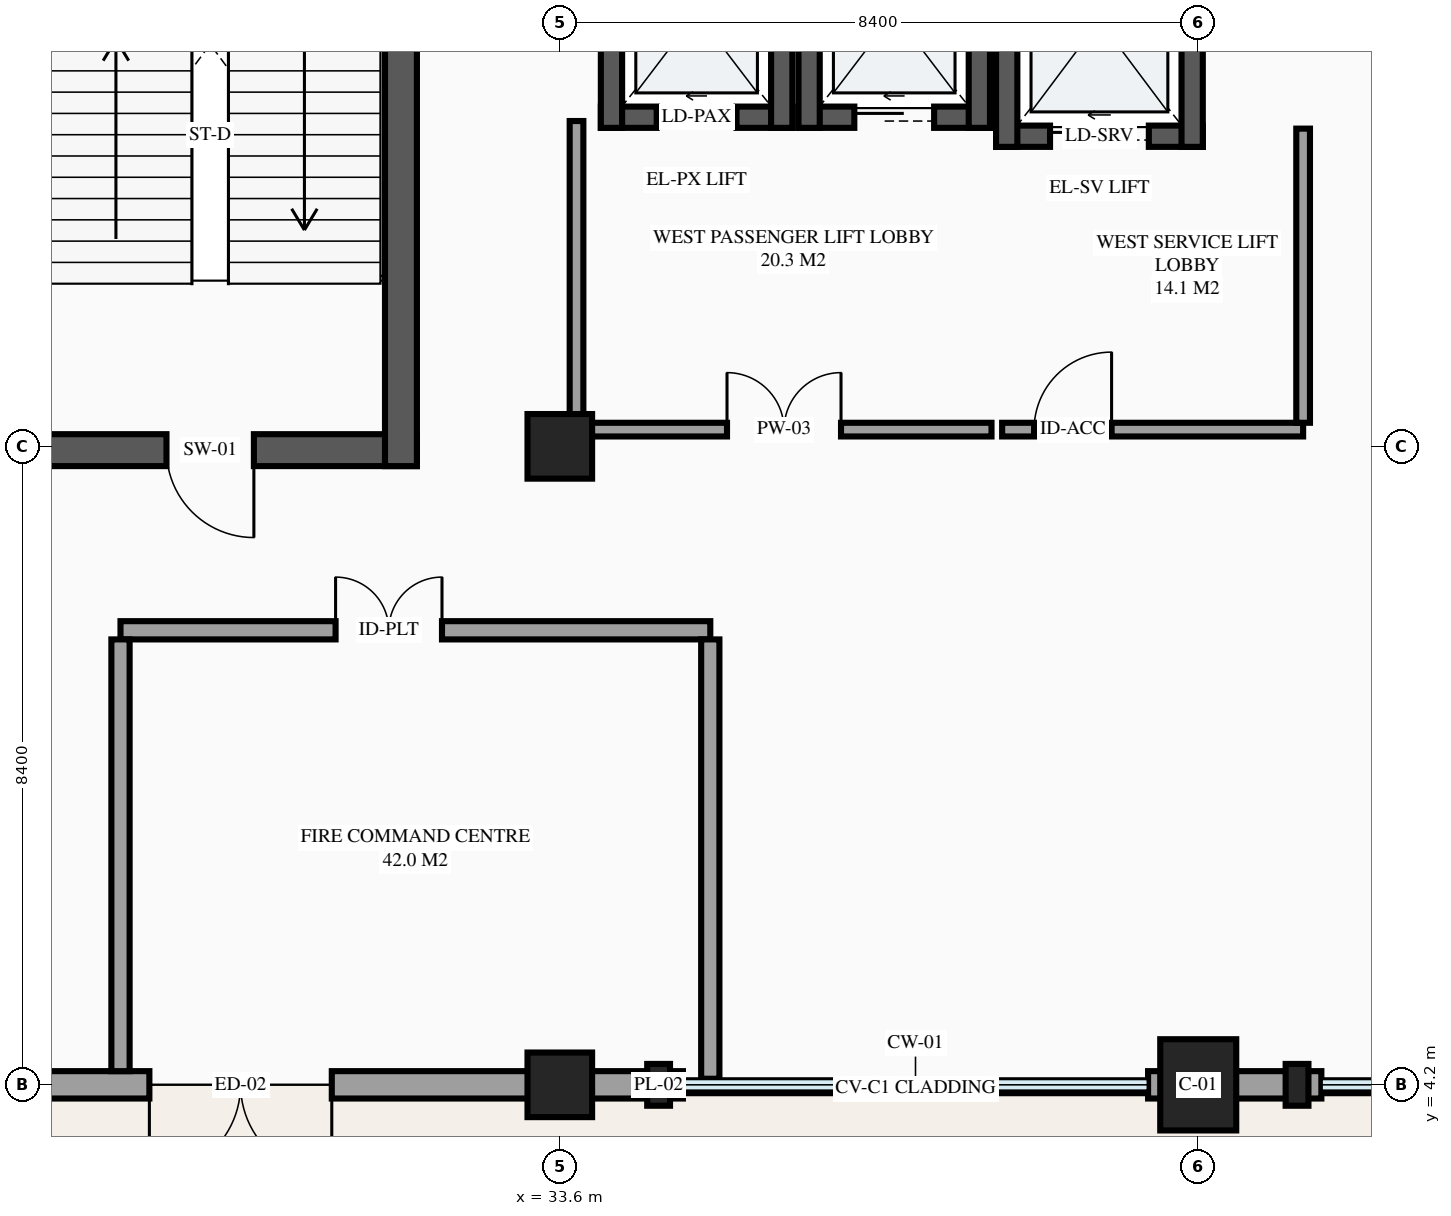
"""IFC4 building model, lengths in metres.
Left out: names, types, materials, properties, quantities, classifications, styles, units other than length and angle.
Written with IfcOpenShell. Run it as: python <this file> out.ifc"""

import sys

from ifc_helpers import new_model, si_unit, direction, frame, frame_2d, origin, origin_2d, place, context, subcontext, project, spatial, rectangle, extrude, element, fill, save


model = new_model("IFC4")
c1 = context("Model", 3, precision=1e-05, world=origin(), true_north=direction((0.0, 1.0)))
c2 = subcontext(c1, "Body", "Model", "MODEL_VIEW")
j1 = project(units=[si_unit("LENGTHUNIT", "METRE"), si_unit("PLANEANGLEUNIT", "RADIAN")], contexts=[c1])
p1 = place(None, origin())
s1 = spatial("IfcSite", under=j1, at=p1, CompositionType="ELEMENT")
p2 = place(p1, origin())
s2 = spatial("IfcBuilding", under=s1, at=p2, CompositionType="ELEMENT")
p3 = place(p2, origin())
s3 = spatial("IfcBuildingStorey", under=s2, at=p3, CompositionType="ELEMENT", Elevation=0.0)
for number, where, z_axis, x_axis in (
    (1, (33.6, 4.2, 0.0), (0.0, 0.0, 1.0), (1.0, 0.0, 0.0)),
    (2, (33.6, 12.6, 0.0), (0.0, 0.0, 1.0), (1.0, 0.0, 0.0)),
):
    element("IfcColumn", number, at=place(p3, frame(where, z_axis=z_axis, x_axis=x_axis)), inside=s3, PredefinedType="COLUMN", context=c2, shape_type="SweptSolid", body=[
        extrude(rectangle(XDim=0.85, YDim=0.85, at=origin_2d()), origin(), (0.0, 0.0, 1.0), 5.4),
    ])
p4 = place(p3, frame((42.0, 4.2, 0.0), z_axis=(0.0, 0.0, 1.0), x_axis=(1.0, 0.0, 0.0)))
e3 = element("IfcColumn", 3, at=p4, inside=s3, PredefinedType="COLUMN", context=c2, shape_type="SweptSolid", body=[
    extrude(rectangle(XDim=1.0, YDim=1.2, at=origin_2d()), origin(), (0.0, 0.0, 1.0), 5.4),
])
for number, where, z_axis, x_axis in (
    (4, (34.9, 4.2, 0.0), (0.0, 0.0, 1.0), (1.0, 0.0, 0.0)),
    (5, (43.3, 4.2, 0.0), (0.0, 0.0, 1.0), (1.0, 0.0, 0.0)),
):
    element("IfcColumn", number, at=place(p3, frame(where, z_axis=z_axis, x_axis=x_axis)), inside=s3, PredefinedType="PILASTER", context=c2, shape_type="SweptSolid", body=[
        extrude(rectangle(XDim=0.3, YDim=0.55, at=origin_2d()), origin(), (0.0, 0.0, 1.0), 5.4),
    ])
p5 = place(p3, frame((25.2, 4.2, 0.0), z_axis=(0.0, 0.0, 1.0), x_axis=(1.0, 0.0, 0.0)))
e6 = element("IfcWall", 6, at=p5, inside=s3, PredefinedType="STANDARD", context=c2, shape_type="SweptSolid", body=[
    extrude(rectangle(XDim=8.4, YDim=0.36, at=frame_2d((4.2, 0.0))), origin(), (0.0, 0.0, 1.0), 4.83),
])
p6 = place(p5, frame((5.4, 0.0, 0.0), z_axis=(0.0, 0.0, 1.0), x_axis=(-1.0, 0.0, 0.0)))
e7 = element("IfcOpeningElement", 7, at=p6, cuts=e6, PredefinedType="OPENING", context=c2, shape_type="SweptSolid", body=[
    extrude(rectangle(XDim=2.4, YDim=2.6, at=frame_2d((1.2, 1.3))), frame((0.0, 0.19, 0.0), z_axis=(0.0, -1.0, 0.0), x_axis=(1.0, 0.0, 0.0)), (0.0, 0.0, 1.0), 0.38),
])
p7 = place(p3, frame((33.6, 4.2, 0.0), z_axis=(0.0, 0.0, 1.0), x_axis=(1.0, 0.0, 0.0)))
e8 = element("IfcWall", 8, at=p7, inside=s3, PredefinedType="STANDARD", context=c2, shape_type="SweptSolid", body=[
    extrude(rectangle(XDim=1.62, YDim=0.36, at=frame_2d((0.81, 0.0))), origin(), (0.0, 0.0, 1.0), 4.611),
])
p8 = place(p3, frame((41.34, 4.2, 0.0), z_axis=(0.0, 0.0, 1.0), x_axis=(1.0, 0.0, 0.0)))
e9 = element("IfcWall", 9, at=p8, inside=s3, PredefinedType="STANDARD", context=c2, shape_type="SweptSolid", body=[
    extrude(rectangle(XDim=0.66, YDim=0.36, at=frame_2d((0.33, 0.0))), origin(), (0.0, 0.0, 1.0), 5.4),
])
p9 = place(p3, frame((42.0, 4.2, 0.0), z_axis=(0.0, 0.0, 1.0), x_axis=(1.0, 0.0, 0.0)))
e10 = element("IfcWall", 10, at=p9, inside=s3, PredefinedType="STANDARD", context=c2, shape_type="SweptSolid", body=[
    extrude(rectangle(XDim=1.62, YDim=0.36, at=frame_2d((0.81, 0.0))), origin(), (0.0, 0.0, 1.0), 4.44),
])
p10 = place(p3, frame((34.14, 16.93, 0.0), z_axis=(0.0, 0.0, 1.0), x_axis=(1.0, 0.0, 0.0)))
e11 = element("IfcWall", 11, at=p10, inside=s3, PredefinedType="SHEAR", context=c2, shape_type="SweptSolid", body=[
    extrude(rectangle(XDim=2.52, YDim=0.28, at=frame_2d((1.26, 0.0))), origin(), (0.0, 0.0, 1.0), 5.4),
])
p11 = place(p10, frame((0.735, 0.0, 0.0)))
e12 = element("IfcOpeningElement", 12, at=p11, cuts=e11, PredefinedType="OPENING", context=c2, shape_type="SweptSolid", body=[
    extrude(rectangle(XDim=1.05, YDim=2.2, at=frame_2d((0.525, 1.1))), frame((0.0, 0.15, 0.0), z_axis=(0.0, -1.0, 0.0), x_axis=(1.0, 0.0, 0.0)), (0.0, 0.0, 1.0), 0.3),
])
for number, where, z_axis, x_axis in (
    (13, (36.52, 16.79, 0.0), (0.0, 0.0, 1.0), (0.0, 1.0, 0.0)),
    (14, (34.28, 19.81, 0.0), (0.0, 0.0, 1.0), (0.0, -1.0, 0.0)),
):
    element("IfcWall", number, at=place(p3, frame(where, z_axis=z_axis, x_axis=x_axis)), inside=s3, PredefinedType="SHEAR", context=c2, shape_type="SweptSolid", body=[
        extrude(rectangle(XDim=3.02, YDim=0.28, at=frame_2d((1.51, 0.0))), origin(), (0.0, 0.0, 1.0), 5.4),
    ])
p12 = place(p3, frame((36.74, 16.93, 0.0), z_axis=(0.0, 0.0, 1.0), x_axis=(1.0, 0.0, 0.0)))
e15 = element("IfcWall", 15, at=p12, inside=s3, PredefinedType="SHEAR", context=c2, shape_type="SweptSolid", body=[
    extrude(rectangle(XDim=2.52, YDim=0.28, at=frame_2d((1.26, 0.0))), origin(), (0.0, 0.0, 1.0), 5.4),
])
p13 = place(p12, frame((0.735, 0.0, 0.0)))
e16 = element("IfcOpeningElement", 16, at=p13, cuts=e15, PredefinedType="OPENING", context=c2, shape_type="SweptSolid", body=[
    extrude(rectangle(XDim=1.05, YDim=2.2, at=frame_2d((0.525, 1.1))), frame((0.0, 0.15, 0.0), z_axis=(0.0, -1.0, 0.0), x_axis=(1.0, 0.0, 0.0)), (0.0, 0.0, 1.0), 0.3),
])
for number, where, z_axis, x_axis in (
    (17, (39.12, 16.79, 0.0), (0.0, 0.0, 1.0), (0.0, 1.0, 0.0)),
    (18, (36.88, 19.81, 0.0), (0.0, 0.0, 1.0), (0.0, -1.0, 0.0)),
):
    element("IfcWall", number, at=place(p3, frame(where, z_axis=z_axis, x_axis=x_axis)), inside=s3, PredefinedType="SHEAR", context=c2, shape_type="SweptSolid", body=[
        extrude(rectangle(XDim=3.02, YDim=0.28, at=frame_2d((1.51, 0.0))), origin(), (0.0, 0.0, 1.0), 5.4),
    ])
p14 = place(p3, frame((39.34, 16.68, 0.0), z_axis=(0.0, 0.0, 1.0), x_axis=(1.0, 0.0, 0.0)))
e19 = element("IfcWall", 19, at=p14, inside=s3, PredefinedType="SHEAR", context=c2, shape_type="SweptSolid", body=[
    extrude(rectangle(XDim=2.72, YDim=0.28, at=frame_2d((1.36, 0.0))), origin(), (0.0, 0.0, 1.0), 5.4),
])
p15 = place(p14, frame((0.71, 0.0, 0.0)))
e20 = element("IfcOpeningElement", 20, at=p15, cuts=e19, PredefinedType="OPENING", context=c2, shape_type="SweptSolid", body=[
    extrude(rectangle(XDim=1.3, YDim=2.25, at=frame_2d((0.65, 1.125))), frame((0.0, 0.15, 0.0), z_axis=(0.0, -1.0, 0.0), x_axis=(1.0, 0.0, 0.0)), (0.0, 0.0, 1.0), 0.3),
])
for number, where, z_axis, x_axis in (
    (21, (41.92, 16.54, 0.0), (0.0, 0.0, 1.0), (0.0, 1.0, 0.0)),
    (22, (39.48, 19.86, 0.0), (0.0, 0.0, 1.0), (0.0, -1.0, 0.0)),
):
    element("IfcWall", number, at=place(p3, frame(where, z_axis=z_axis, x_axis=x_axis)), inside=s3, PredefinedType="SHEAR", context=c2, shape_type="SweptSolid", body=[
        extrude(rectangle(XDim=3.32, YDim=0.28, at=frame_2d((1.66, 0.0))), origin(), (0.0, 0.0, 1.0), 5.4),
    ])
p16 = place(p3, frame((26.28, 12.55, 0.0), z_axis=(0.0, 0.0, 1.0), x_axis=(1.0, 0.0, 0.0)))
e23 = element("IfcWall", 23, at=p16, inside=s3, PredefinedType="SHEAR", context=c2, shape_type="SweptSolid", body=[
    extrude(rectangle(XDim=5.44, YDim=0.42, at=frame_2d((2.72, 0.0))), origin(), (0.0, 0.0, 1.0), 5.4),
])
p17 = place(p16, frame((3.295, 0.0, 0.0), z_axis=(0.0, 0.0, 1.0), x_axis=(-1.0, 0.0, 0.0)))
e24 = element("IfcOpeningElement", 24, at=p17, cuts=e23, PredefinedType="OPENING", context=c2, shape_type="SweptSolid", body=[
    extrude(rectangle(XDim=1.15, YDim=2.15, at=frame_2d((0.575, 1.075))), frame((0.0, 0.22, 0.0), z_axis=(0.0, -1.0, 0.0), x_axis=(1.0, 0.0, 0.0)), (0.0, 0.0, 1.0), 0.44),
])
p18 = place(p3, frame((31.51, 12.34, 0.0), z_axis=(0.0, 0.0, 1.0), x_axis=(0.0, 1.0, 0.0)))
e25 = element("IfcWall", 25, at=p18, inside=s3, PredefinedType="SHEAR", context=c2, shape_type="SweptSolid", body=[
    extrude(rectangle(XDim=9.08, YDim=0.42, at=frame_2d((4.54, 0.0))), origin(), (0.0, 0.0, 1.0), 5.4),
])
p19 = place(p3, frame((33.82, 12.82, 0.0), z_axis=(0.0, 0.0, 1.0), x_axis=(1.0, 0.0, 0.0)))
e26 = element("IfcWall", 26, at=p19, inside=s3, PredefinedType="PARTITIONING", context=c2, shape_type="SweptSolid", body=[
    extrude(rectangle(XDim=5.46, YDim=0.18, at=frame_2d((2.73, 0.0))), origin(), (0.0, 0.0, 1.0), 5.135),
])
p20 = place(p19, frame((1.98, 0.0, 0.0)))
e27 = element("IfcOpeningElement", 27, at=p20, cuts=e26, PredefinedType="OPENING", context=c2, shape_type="SweptSolid", body=[
    extrude(rectangle(XDim=1.5, YDim=2.15, at=frame_2d((0.75, 1.075))), frame((0.0, 0.1, 0.0), z_axis=(0.0, -1.0, 0.0), x_axis=(1.0, 0.0, 0.0)), (0.0, 0.0, 1.0), 0.2),
])
p21 = place(p3, frame((33.82, 12.91, 0.0), z_axis=(0.0, 0.0, 1.0), x_axis=(0.0, 1.0, 0.0)))
e28 = element("IfcWall", 28, at=p21, inside=s3, PredefinedType="PARTITIONING", context=c2, shape_type="SweptSolid", body=[
    extrude(rectangle(XDim=3.97, YDim=0.18, at=frame_2d((1.985, 0.0))), origin(), (0.0, 0.0, 1.0), 4.24),
])
p22 = place(p3, frame((39.42, 12.82, 0.0), z_axis=(0.0, 0.0, 1.0), x_axis=(1.0, 0.0, 0.0)))
e29 = element("IfcWall", 29, at=p22, inside=s3, PredefinedType="PARTITIONING", context=c2, shape_type="SweptSolid", body=[
    extrude(rectangle(XDim=3.96, YDim=0.18, at=frame_2d((1.98, 0.0))), origin(), (0.0, 0.0, 1.0), 5.135),
])
p23 = place(p22, frame((0.42, 0.0, 0.0)))
e30 = element("IfcOpeningElement", 30, at=p23, cuts=e29, PredefinedType="OPENING", context=c2, shape_type="SweptSolid", body=[
    extrude(rectangle(XDim=1.02, YDim=2.15, at=frame_2d((0.51, 1.075))), frame((0.0, 0.1, 0.0), z_axis=(0.0, -1.0, 0.0), x_axis=(1.0, 0.0, 0.0)), (0.0, 0.0, 1.0), 0.2),
])
p24 = place(p3, frame((43.38, 12.91, 0.0), z_axis=(0.0, 0.0, 1.0), x_axis=(0.0, 1.0, 0.0)))
e31 = element("IfcWall", 31, at=p24, inside=s3, PredefinedType="PARTITIONING", context=c2, shape_type="SweptSolid", body=[
    extrude(rectangle(XDim=3.87, YDim=0.18, at=frame_2d((1.935, 0.0))), origin(), (0.0, 0.0, 1.0), 5.135),
])
p25 = place(p3, frame((27.82, 10.18, 0.0), z_axis=(0.0, 0.0, 1.0), x_axis=(1.0, 0.0, 0.0)))
e32 = element("IfcWall", 32, at=p25, inside=s3, PredefinedType="PARTITIONING", context=c2, shape_type="SweptSolid", body=[
    extrude(rectangle(XDim=7.76, YDim=0.24, at=frame_2d((3.88, 0.0))), origin(), (0.0, 0.0, 1.0), 5.135),
])
p26 = place(p25, frame((2.83, 0.0, 0.0)))
e33 = element("IfcOpeningElement", 33, at=p26, cuts=e32, PredefinedType="OPENING", context=c2, shape_type="SweptSolid", body=[
    extrude(rectangle(XDim=1.4, YDim=2.2, at=frame_2d((0.7, 1.1))), frame((0.0, 0.13, 0.0), z_axis=(0.0, -1.0, 0.0), x_axis=(1.0, 0.0, 0.0)), (0.0, 0.0, 1.0), 0.26),
])
p27 = place(p3, frame((27.82, 4.38, 0.0), z_axis=(0.0, 0.0, 1.0), x_axis=(0.0, 1.0, 0.0)))
e34 = element("IfcWall", 34, at=p27, inside=s3, PredefinedType="PARTITIONING", context=c2, shape_type="SweptSolid", body=[
    extrude(rectangle(XDim=5.68, YDim=0.24, at=frame_2d((2.84, 0.0))), origin(), (0.0, 0.0, 1.0), 5.135),
])
p28 = place(p3, frame((35.58, 4.28, 0.0), z_axis=(0.0, 0.0, 1.0), x_axis=(0.0, 1.0, 0.0)))
e35 = element("IfcWall", 35, at=p28, inside=s3, PredefinedType="PARTITIONING", context=c2, shape_type="SweptSolid", body=[
    extrude(rectangle(XDim=5.78, YDim=0.24, at=frame_2d((2.89, 0.0))), origin(), (0.0, 0.0, 1.0), 5.135),
])
p29 = place(p6, origin())
e36 = element("IfcDoor", 36, at=p29, inside=s3, OperationType="DOUBLE_DOOR_SINGLE_SWING", PredefinedType="DOOR", context=c2, shape_type="SweptSolid", body=[
    extrude(rectangle(XDim=2.4, YDim=2.6, at=frame_2d((1.2, 1.3))), frame((0.0, 0.025, 0.0), z_axis=(0.0, -1.0, 0.0), x_axis=(1.0, 0.0, 0.0)), (0.0, 0.0, 1.0), 0.05),
])
fill(e7, e36)
p30 = place(p11, origin())
e37 = element("IfcDoor", 37, at=p30, inside=s3, OperationType="SLIDING_TO_LEFT", PredefinedType="DOOR", context=c2, shape_type="SweptSolid", body=[
    extrude(rectangle(XDim=1.05, YDim=2.2, at=frame_2d((0.525, 1.1))), frame((0.0, 0.025, 0.0), z_axis=(0.0, -1.0, 0.0), x_axis=(1.0, 0.0, 0.0)), (0.0, 0.0, 1.0), 0.05),
])
fill(e12, e37)
p31 = place(p13, origin())
e38 = element("IfcDoor", 38, at=p31, inside=s3, OperationType="SLIDING_TO_LEFT", PredefinedType="DOOR", context=c2, shape_type="SweptSolid", body=[
    extrude(rectangle(XDim=1.05, YDim=2.2, at=frame_2d((0.525, 1.1))), frame((0.0, 0.025, 0.0), z_axis=(0.0, -1.0, 0.0), x_axis=(1.0, 0.0, 0.0)), (0.0, 0.0, 1.0), 0.05),
])
fill(e16, e38)
p32 = place(p15, origin())
e39 = element("IfcDoor", 39, at=p32, inside=s3, OperationType="SLIDING_TO_LEFT", PredefinedType="DOOR", context=c2, shape_type="SweptSolid", body=[
    extrude(rectangle(XDim=1.3, YDim=2.25, at=frame_2d((0.65, 1.125))), frame((0.0, 0.025, 0.0), z_axis=(0.0, -1.0, 0.0), x_axis=(1.0, 0.0, 0.0)), (0.0, 0.0, 1.0), 0.05),
])
fill(e20, e39)
p33 = place(p17, origin())
e40 = element("IfcDoor", 40, at=p33, inside=s3, OperationType="SINGLE_SWING_RIGHT", PredefinedType="DOOR", context=c2, shape_type="SweptSolid", body=[
    extrude(rectangle(XDim=1.15, YDim=2.15, at=frame_2d((0.575, 1.075))), frame((0.0, 0.025, 0.0), z_axis=(0.0, -1.0, 0.0), x_axis=(1.0, 0.0, 0.0)), (0.0, 0.0, 1.0), 0.05),
])
fill(e24, e40)
p34 = place(p20, origin())
e41 = element("IfcDoor", 41, at=p34, inside=s3, OperationType="DOUBLE_DOOR_SINGLE_SWING", PredefinedType="DOOR", context=c2, shape_type="SweptSolid", body=[
    extrude(rectangle(XDim=1.5, YDim=2.15, at=frame_2d((0.75, 1.075))), frame((0.0, 0.025, 0.0), z_axis=(0.0, -1.0, 0.0), x_axis=(1.0, 0.0, 0.0)), (0.0, 0.0, 1.0), 0.05),
])
fill(e27, e41)
p35 = place(p23, origin())
e42 = element("IfcDoor", 42, at=p35, inside=s3, OperationType="SINGLE_SWING_RIGHT", PredefinedType="DOOR", context=c2, shape_type="SweptSolid", body=[
    extrude(rectangle(XDim=1.02, YDim=2.15, at=frame_2d((0.51, 1.075))), frame((0.0, 0.025, 0.0), z_axis=(0.0, -1.0, 0.0), x_axis=(1.0, 0.0, 0.0)), (0.0, 0.0, 1.0), 0.05),
])
fill(e30, e42)
p36 = place(p26, origin())
e43 = element("IfcDoor", 43, at=p36, inside=s3, OperationType="DOUBLE_DOOR_SINGLE_SWING", PredefinedType="DOOR", context=c2, shape_type="SweptSolid", body=[
    extrude(rectangle(XDim=1.4, YDim=2.2, at=frame_2d((0.7, 1.1))), frame((0.0, 0.025, 0.0), z_axis=(0.0, -1.0, 0.0), x_axis=(1.0, 0.0, 0.0)), (0.0, 0.0, 1.0), 0.05),
])
fill(e33, e43)
save(model, sys.argv[1])
